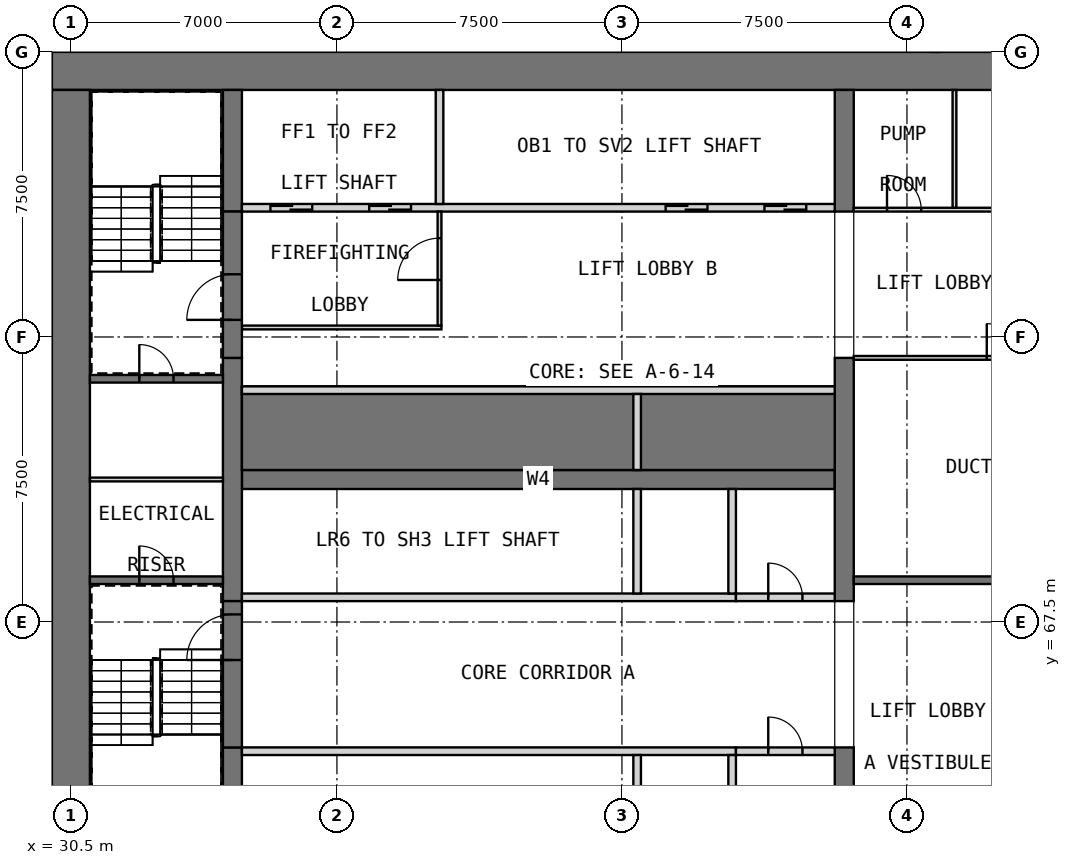
"""IFC4 building model, lengths in metres.
Left out: names, types, materials, properties, quantities, classifications, styles, units other than length and angle.
Written with IfcOpenShell. Run it as: python <this file> out.ifc"""

import sys

from ifc_helpers import new_model, si_unit, direction, frame, frame_2d, origin, place, context, subcontext, project, spatial, rectangle, extrude, element, fill, save


model = new_model("IFC4")
c1 = context("Model", 3, precision=1e-05, world=origin(), true_north=direction((0.0, 1.0)))
c2 = subcontext(c1, "Body", "Model", "MODEL_VIEW")
j1 = project(units=[si_unit("LENGTHUNIT", "METRE"), si_unit("PLANEANGLEUNIT", "RADIAN")], contexts=[c1])
p1 = place(None, origin())
s1 = spatial("IfcSite", under=j1, at=p1, CompositionType="ELEMENT")
p2 = place(p1, origin())
s2 = spatial("IfcBuilding", under=s1, at=p2, CompositionType="ELEMENT")
p3 = place(p2, frame((0.0, 0.0, 118.7)))
s3 = spatial("IfcBuildingStorey", under=s2, at=p3, CompositionType="ELEMENT", Elevation=118.7)
p4 = place(p3, frame((30.0, 82.0, 0.0), z_axis=(0.0, 0.0, 1.0), x_axis=(1.0, 0.0, 0.0)))
e1 = element("IfcWall", 1, at=p4, inside=s3, PredefinedType="SHEAR", context=c2, shape_type="SweptSolid", body=[
    extrude(rectangle(XDim=30.0, YDim=1.0, at=frame_2d((15.0, 0.0))), origin(), (0.0, 0.0, 1.0), 5.5),
])
p5 = place(p3, frame((30.5, 61.0, 0.0), z_axis=(0.0, 0.0, 1.0), x_axis=(0.0, 1.0, 0.0)))
e2 = element("IfcWall", 2, at=p5, inside=s3, PredefinedType="SHEAR", context=c2, shape_type="SweptSolid", body=[
    extrude(rectangle(XDim=20.5, YDim=1.0, at=frame_2d((10.25, 0.0))), origin(), (0.0, 0.0, 1.0), 5.5),
])
p6 = place(p3, frame((35.0, 71.25, 0.0), z_axis=(0.0, 0.0, 1.0), x_axis=(1.0, 0.0, 0.0)))
e3 = element("IfcWall", 3, at=p6, inside=s3, PredefinedType="SHEAR", context=c2, shape_type="SweptSolid", body=[
    extrude(rectangle(XDim=15.6, YDim=0.5, at=frame_2d((7.8, 0.0))), origin(), (0.0, 0.0, 1.0), 5.5),
])
p7 = place(p3, frame((34.75, 61.0, 0.0), z_axis=(0.0, 0.0, 1.0), x_axis=(0.0, 1.0, 0.0)))
e4 = element("IfcWall", 4, at=p7, inside=s3, PredefinedType="SHEAR", context=c2, shape_type="SweptSolid", body=[
    extrude(rectangle(XDim=3.2, YDim=0.5, at=frame_2d((1.6, 0.0))), origin(), (0.0, 0.0, 1.0), 5.5),
])
p8 = place(p3, frame((34.75, 68.05, 0.0), z_axis=(0.0, 0.0, 1.0), x_axis=(0.0, 1.0, 0.0)))
e5 = element("IfcWall", 5, at=p8, inside=s3, PredefinedType="SHEAR", context=c2, shape_type="SweptSolid", body=[
    extrude(rectangle(XDim=6.4, YDim=0.5, at=frame_2d((3.2, 0.0))), origin(), (0.0, 0.0, 1.0), 5.5),
])
for number, where, z_axis, x_axis in (
    (6, (34.75, 78.3, 0.0), (0.0, 0.0, 1.0), (0.0, 1.0, 0.0)),
    (7, (50.85, 61.0, 0.0), (0.0, 0.0, 1.0), (0.0, 1.0, 0.0)),
):
    element("IfcWall", number, at=place(p3, frame(where, z_axis=z_axis, x_axis=x_axis)), inside=s3, PredefinedType="SHEAR", context=c2, shape_type="SweptSolid", body=[
        extrude(rectangle(XDim=3.2, YDim=0.5, at=frame_2d((1.6, 0.0))), origin(), (0.0, 0.0, 1.0), 5.5),
    ])
p9 = place(p3, frame((50.85, 68.05, 0.0), z_axis=(0.0, 0.0, 1.0), x_axis=(0.0, 1.0, 0.0)))
e8 = element("IfcWall", 8, at=p9, inside=s3, PredefinedType="SHEAR", context=c2, shape_type="SweptSolid", body=[
    extrude(rectangle(XDim=6.4, YDim=0.5, at=frame_2d((3.2, 0.0))), origin(), (0.0, 0.0, 1.0), 5.5),
])
p10 = place(p3, frame((50.85, 78.3, 0.0), z_axis=(0.0, 0.0, 1.0), x_axis=(0.0, 1.0, 0.0)))
e9 = element("IfcWall", 9, at=p10, inside=s3, PredefinedType="SHEAR", context=c2, shape_type="SweptSolid", body=[
    extrude(rectangle(XDim=3.2, YDim=0.5, at=frame_2d((1.6, 0.0))), origin(), (0.0, 0.0, 1.0), 5.5),
])
p11 = place(p3, frame((35.0, 64.1, 0.0), z_axis=(0.0, 0.0, 1.0), x_axis=(1.0, 0.0, 0.0)))
e10 = element("IfcWall", 10, at=p11, inside=s3, PredefinedType="SOLIDWALL", context=c2, shape_type="SweptSolid", body=[
    extrude(rectangle(XDim=13.0, YDim=0.2, at=frame_2d((6.5, 0.0))), origin(), (0.0, 0.0, 1.0), 5.5),
])
for number, where, z_axis, x_axis in (
    (11, (45.4, 61.0, 0.0), (0.0, 0.0, 1.0), (0.0, 1.0, 0.0)),
    (12, (47.9, 61.0, 0.0), (0.0, 0.0, 1.0), (0.0, 1.0, 0.0)),
):
    element("IfcWall", number, at=place(p3, frame(where, z_axis=z_axis, x_axis=x_axis)), inside=s3, PredefinedType="SOLIDWALL", context=c2, shape_type="SweptSolid", body=[
        extrude(rectangle(XDim=3.0, YDim=0.2, at=frame_2d((1.5, 0.0))), origin(), (0.0, 0.0, 1.0), 5.5),
    ])
p12 = place(p3, frame((48.0, 64.1, 0.0), z_axis=(0.0, 0.0, 1.0), x_axis=(1.0, 0.0, 0.0)))
e13 = element("IfcWall", 13, at=p12, inside=s3, PredefinedType="PARTITIONING", context=c2, shape_type="SweptSolid", body=[
    extrude(rectangle(XDim=2.6, YDim=0.2, at=frame_2d((1.3, 0.0))), origin(), (0.0, 0.0, 1.0), 5.2),
])
p13 = place(p12, frame((0.85, 0.0, 0.0)))
e14 = element("IfcOpeningElement", 14, at=p13, cuts=e13, PredefinedType="OPENING", context=c2, shape_type="SweptSolid", body=[
    extrude(rectangle(XDim=0.9, YDim=2.1, at=frame_2d((0.45, 1.05))), frame((0.0, 0.11, 0.0), z_axis=(0.0, -1.0, 0.0), x_axis=(1.0, 0.0, 0.0)), (0.0, 0.0, 1.0), 0.22),
])
p14 = place(p3, frame((35.0, 68.15, 0.0), z_axis=(0.0, 0.0, 1.0), x_axis=(1.0, 0.0, 0.0)))
e15 = element("IfcWall", 15, at=p14, inside=s3, PredefinedType="SOLIDWALL", context=c2, shape_type="SweptSolid", body=[
    extrude(rectangle(XDim=13.0, YDim=0.2, at=frame_2d((6.5, 0.0))), origin(), (0.0, 0.0, 1.0), 5.5),
])
for number, where, z_axis, x_axis in (
    (16, (45.4, 68.25, 0.0), (0.0, 0.0, 1.0), (0.0, 1.0, 0.0)),
    (17, (47.9, 68.25, 0.0), (0.0, 0.0, 1.0), (0.0, 1.0, 0.0)),
):
    element("IfcWall", number, at=place(p3, frame(where, z_axis=z_axis, x_axis=x_axis)), inside=s3, PredefinedType="SOLIDWALL", context=c2, shape_type="SweptSolid", body=[
        extrude(rectangle(XDim=2.75, YDim=0.2, at=frame_2d((1.375, 0.0))), origin(), (0.0, 0.0, 1.0), 5.5),
    ])
p15 = place(p3, frame((48.0, 68.15, 0.0), z_axis=(0.0, 0.0, 1.0), x_axis=(1.0, 0.0, 0.0)))
e18 = element("IfcWall", 18, at=p15, inside=s3, PredefinedType="PARTITIONING", context=c2, shape_type="SweptSolid", body=[
    extrude(rectangle(XDim=2.6, YDim=0.2, at=frame_2d((1.3, 0.0))), origin(), (0.0, 0.0, 1.0), 5.2),
])
p16 = place(p15, frame((0.85, 0.0, 0.0)))
e19 = element("IfcOpeningElement", 19, at=p16, cuts=e18, PredefinedType="OPENING", context=c2, shape_type="SweptSolid", body=[
    extrude(rectangle(XDim=0.9, YDim=2.1, at=frame_2d((0.45, 1.05))), frame((0.0, 0.11, 0.0), z_axis=(0.0, -1.0, 0.0), x_axis=(1.0, 0.0, 0.0)), (0.0, 0.0, 1.0), 0.22),
])
p17 = place(p3, frame((35.0, 72.6, 0.0), z_axis=(0.0, 0.0, 1.0), x_axis=(1.0, 0.0, 0.0)))
e20 = element("IfcWall", 20, at=p17, inside=s3, PredefinedType="SOLIDWALL", context=c2, shape_type="SweptSolid", body=[
    extrude(rectangle(XDim=15.6, YDim=2.2, at=frame_2d((7.8, 0.0))), origin(), (0.0, 0.0, 1.0), 3.9),
])
p18 = place(p3, frame((35.0, 73.6, 3.9), z_axis=(0.0, 0.0, 1.0), x_axis=(1.0, 0.0, 0.0)))
e21 = element("IfcWall", 21, at=p18, inside=s3, PredefinedType="SOLIDWALL", context=c2, shape_type="SweptSolid", body=[
    extrude(rectangle(XDim=15.6, YDim=0.2, at=frame_2d((7.8, 0.0))), origin(), (0.0, 0.0, 1.0), 1.6),
])
p19 = place(p3, frame((45.4, 71.5, 3.9), z_axis=(0.0, 0.0, 1.0), x_axis=(0.0, 1.0, 0.0)))
e22 = element("IfcWall", 22, at=p19, inside=s3, PredefinedType="SOLIDWALL", context=c2, shape_type="SweptSolid", body=[
    extrude(rectangle(XDim=2.0, YDim=0.2, at=frame_2d((1.0, 0.0))), origin(), (0.0, 0.0, 1.0), 1.6),
])
p20 = place(p3, frame((35.0, 78.4, 0.0), z_axis=(0.0, 0.0, 1.0), x_axis=(1.0, 0.0, 0.0)))
e23 = element("IfcWall", 23, at=p20, inside=s3, PredefinedType="SOLIDWALL", context=c2, shape_type="SweptSolid", body=[
    extrude(rectangle(XDim=15.6, YDim=0.2, at=frame_2d((7.8, 0.0))), origin(), (0.0, 0.0, 1.0), 5.5),
])
p21 = place(p20, frame((0.75, 0.0, 0.0)))
e24 = element("IfcOpeningElement", 24, at=p21, cuts=e23, PredefinedType="OPENING", context=c2, shape_type="SweptSolid", body=[
    extrude(rectangle(XDim=1.1, YDim=2.1, at=frame_2d((0.55, 1.05))), frame((0.0, 0.11, 0.0), z_axis=(0.0, -1.0, 0.0), x_axis=(1.0, 0.0, 0.0)), (0.0, 0.0, 1.0), 0.22),
])
p22 = place(p20, frame((3.35, 0.0, 0.0)))
e25 = element("IfcOpeningElement", 25, at=p22, cuts=e23, PredefinedType="OPENING", context=c2, shape_type="SweptSolid", body=[
    extrude(rectangle(XDim=1.1, YDim=2.1, at=frame_2d((0.55, 1.05))), frame((0.0, 0.11, 0.0), z_axis=(0.0, -1.0, 0.0), x_axis=(1.0, 0.0, 0.0)), (0.0, 0.0, 1.0), 0.22),
])
p23 = place(p20, frame((11.15, 0.0, 0.0)))
e26 = element("IfcOpeningElement", 26, at=p23, cuts=e23, PredefinedType="OPENING", context=c2, shape_type="SweptSolid", body=[
    extrude(rectangle(XDim=1.1, YDim=2.1, at=frame_2d((0.55, 1.05))), frame((0.0, 0.11, 0.0), z_axis=(0.0, -1.0, 0.0), x_axis=(1.0, 0.0, 0.0)), (0.0, 0.0, 1.0), 0.22),
])
p24 = place(p20, frame((13.75, 0.0, 0.0)))
e27 = element("IfcOpeningElement", 27, at=p24, cuts=e23, PredefinedType="OPENING", context=c2, shape_type="SweptSolid", body=[
    extrude(rectangle(XDim=1.1, YDim=2.1, at=frame_2d((0.55, 1.05))), frame((0.0, 0.11, 0.0), z_axis=(0.0, -1.0, 0.0), x_axis=(1.0, 0.0, 0.0)), (0.0, 0.0, 1.0), 0.22),
])
p25 = place(p3, frame((40.2, 78.5, 0.0), z_axis=(0.0, 0.0, 1.0), x_axis=(0.0, 1.0, 0.0)))
e28 = element("IfcWall", 28, at=p25, inside=s3, PredefinedType="SOLIDWALL", context=c2, shape_type="SweptSolid", body=[
    extrude(rectangle(XDim=3.0, YDim=0.2, at=frame_2d((1.5, 0.0))), origin(), (0.0, 0.0, 1.0), 5.5),
])
p26 = place(p3, frame((35.0, 75.25, 0.0), z_axis=(0.0, 0.0, 1.0), x_axis=(1.0, 0.0, 0.0)))
e29 = element("IfcWall", 29, at=p26, inside=s3, PredefinedType="PARTITIONING", context=c2, shape_type="SweptSolid", body=[
    extrude(rectangle(XDim=5.25, YDim=0.1, at=frame_2d((2.625, 0.0))), origin(), (0.0, 0.0, 1.0), 5.2),
])
p27 = place(p3, frame((40.2, 75.3, 0.0), z_axis=(0.0, 0.0, 1.0), x_axis=(0.0, 1.0, 0.0)))
e30 = element("IfcWall", 30, at=p27, inside=s3, PredefinedType="PARTITIONING", context=c2, shape_type="SweptSolid", body=[
    extrude(rectangle(XDim=3.0, YDim=0.1, at=frame_2d((1.5, 0.0))), origin(), (0.0, 0.0, 1.0), 5.2),
])
p28 = place(p27, frame((1.2, 0.0, 0.0)))
e31 = element("IfcOpeningElement", 31, at=p28, cuts=e30, PredefinedType="OPENING", context=c2, shape_type="SweptSolid", body=[
    extrude(rectangle(XDim=1.1, YDim=2.1, at=frame_2d((0.55, 1.05))), frame((0.0, 0.06, 0.0), z_axis=(0.0, -1.0, 0.0), x_axis=(1.0, 0.0, 0.0)), (0.0, 0.0, 1.0), 0.12),
])
p29 = place(p3, frame((34.75, 64.2, 0.0), z_axis=(0.0, 0.0, 1.0), x_axis=(0.0, 1.0, 0.0)))
e32 = element("IfcWall", 32, at=p29, inside=s3, PredefinedType="SOLIDWALL", context=c2, shape_type="SweptSolid", body=[
    extrude(rectangle(XDim=3.85, YDim=0.5, at=frame_2d((1.925, 0.0))), origin(), (0.0, 0.0, 1.0), 4.3),
])
p30 = place(p29, frame((2.3, 0.0, 0.0)))
e33 = element("IfcOpeningElement", 33, at=p30, cuts=e32, PredefinedType="OPENING", context=c2, shape_type="SweptSolid", body=[
    extrude(rectangle(XDim=1.2, YDim=2.1, at=frame_2d((0.6, 1.05))), frame((0.0, 0.26, 0.0), z_axis=(0.0, -1.0, 0.0), x_axis=(1.0, 0.0, 0.0)), (0.0, 0.0, 1.0), 0.52),
])
p31 = place(p3, frame((34.75, 74.45, 0.0), z_axis=(0.0, 0.0, 1.0), x_axis=(0.0, 1.0, 0.0)))
e34 = element("IfcWall", 34, at=p31, inside=s3, PredefinedType="SOLIDWALL", context=c2, shape_type="SweptSolid", body=[
    extrude(rectangle(XDim=3.85, YDim=0.5, at=frame_2d((1.925, 0.0))), origin(), (0.0, 0.0, 1.0), 4.3),
])
p32 = place(p31, frame((1.0, 0.0, 0.0)))
e35 = element("IfcOpeningElement", 35, at=p32, cuts=e34, PredefinedType="OPENING", context=c2, shape_type="SweptSolid", body=[
    extrude(rectangle(XDim=1.2, YDim=2.1, at=frame_2d((0.6, 1.05))), frame((0.0, 0.26, 0.0), z_axis=(0.0, -1.0, 0.0), x_axis=(1.0, 0.0, 0.0)), (0.0, 0.0, 1.0), 0.52),
])
p33 = place(p3, frame((31.0, 68.6, 0.0), z_axis=(0.0, 0.0, 1.0), x_axis=(1.0, 0.0, 0.0)))
e36 = element("IfcWall", 36, at=p33, inside=s3, PredefinedType="SOLIDWALL", context=c2, shape_type="SweptSolid", body=[
    extrude(rectangle(XDim=3.5, YDim=0.2, at=frame_2d((1.75, 0.0))), origin(), (0.0, 0.0, 1.0), 5.2),
])
p34 = place(p33, frame((1.3, 0.0, 0.0)))
e37 = element("IfcOpeningElement", 37, at=p34, cuts=e36, PredefinedType="OPENING", context=c2, shape_type="SweptSolid", body=[
    extrude(rectangle(XDim=0.9, YDim=2.1, at=frame_2d((0.45, 1.05))), frame((0.0, 0.11, 0.0), z_axis=(0.0, -1.0, 0.0), x_axis=(1.0, 0.0, 0.0)), (0.0, 0.0, 1.0), 0.22),
])
p35 = place(p3, frame((31.0, 73.9, 0.0), z_axis=(0.0, 0.0, 1.0), x_axis=(1.0, 0.0, 0.0)))
e38 = element("IfcWall", 38, at=p35, inside=s3, PredefinedType="SOLIDWALL", context=c2, shape_type="SweptSolid", body=[
    extrude(rectangle(XDim=3.5, YDim=0.2, at=frame_2d((1.75, 0.0))), origin(), (0.0, 0.0, 1.0), 5.2),
])
p36 = place(p35, frame((1.3, 0.0, 0.0)))
e39 = element("IfcOpeningElement", 39, at=p36, cuts=e38, PredefinedType="OPENING", context=c2, shape_type="SweptSolid", body=[
    extrude(rectangle(XDim=0.9, YDim=2.1, at=frame_2d((0.45, 1.05))), frame((0.0, 0.11, 0.0), z_axis=(0.0, -1.0, 0.0), x_axis=(1.0, 0.0, 0.0)), (0.0, 0.0, 1.0), 0.22),
])
p37 = place(p3, frame((51.1, 68.6, 0.0), z_axis=(0.0, 0.0, 1.0), x_axis=(1.0, 0.0, 0.0)))
e40 = element("IfcWall", 40, at=p37, inside=s3, PredefinedType="SOLIDWALL", context=c2, shape_type="SweptSolid", body=[
    extrude(rectangle(XDim=7.9, YDim=0.2, at=frame_2d((3.95, 0.0))), origin(), (0.0, 0.0, 1.0), 5.2),
])
p38 = place(p3, frame((31.0, 71.25, 0.0), z_axis=(0.0, 0.0, 1.0), x_axis=(1.0, 0.0, 0.0)))
e41 = element("IfcWall", 41, at=p38, inside=s3, PredefinedType="PARTITIONING", context=c2, shape_type="SweptSolid", body=[
    extrude(rectangle(XDim=3.5, YDim=0.1, at=frame_2d((1.75, 0.0))), origin(), (0.0, 0.0, 1.0), 5.2),
])
p39 = place(p3, frame((51.1, 74.45, 0.0), z_axis=(0.0, 0.0, 1.0), x_axis=(1.0, 0.0, 0.0)))
e42 = element("IfcWall", 42, at=p39, inside=s3, PredefinedType="PARTITIONING", context=c2, shape_type="SweptSolid", body=[
    extrude(rectangle(XDim=7.9, YDim=0.1, at=frame_2d((3.95, 0.0))), origin(), (0.0, 0.0, 1.0), 5.2),
])
p40 = place(p39, frame((3.5, 0.0, 0.0)))
e43 = element("IfcOpeningElement", 43, at=p40, cuts=e42, PredefinedType="OPENING", context=c2, shape_type="SweptSolid", body=[
    extrude(rectangle(XDim=0.9, YDim=2.1, at=frame_2d((0.45, 1.05))), frame((0.0, 0.06, 0.0), z_axis=(0.0, -1.0, 0.0), x_axis=(1.0, 0.0, 0.0)), (0.0, 0.0, 1.0), 0.12),
])
p41 = place(p3, frame((51.1, 78.35, 0.0), z_axis=(0.0, 0.0, 1.0), x_axis=(1.0, 0.0, 0.0)))
e44 = element("IfcWall", 44, at=p41, inside=s3, PredefinedType="PARTITIONING", context=c2, shape_type="SweptSolid", body=[
    extrude(rectangle(XDim=7.9, YDim=0.1, at=frame_2d((3.95, 0.0))), origin(), (0.0, 0.0, 1.0), 5.2),
])
p42 = place(p41, frame((0.875, 0.0, 0.0)))
e45 = element("IfcOpeningElement", 45, at=p42, cuts=e44, PredefinedType="OPENING", context=c2, shape_type="SweptSolid", body=[
    extrude(rectangle(XDim=0.9, YDim=2.1, at=frame_2d((0.45, 1.05))), frame((0.0, 0.06, 0.0), z_axis=(0.0, -1.0, 0.0), x_axis=(1.0, 0.0, 0.0)), (0.0, 0.0, 1.0), 0.12),
])
p43 = place(p41, frame((4.825, 0.0, 0.0)))
e46 = element("IfcOpeningElement", 46, at=p43, cuts=e44, PredefinedType="OPENING", context=c2, shape_type="SweptSolid", body=[
    extrude(rectangle(XDim=0.9, YDim=2.1, at=frame_2d((0.45, 1.05))), frame((0.0, 0.06, 0.0), z_axis=(0.0, -1.0, 0.0), x_axis=(1.0, 0.0, 0.0)), (0.0, 0.0, 1.0), 0.12),
])
p44 = place(p3, frame((53.75, 78.4, 0.0), z_axis=(0.0, 0.0, 1.0), x_axis=(0.0, 1.0, 0.0)))
e47 = element("IfcWall", 47, at=p44, inside=s3, PredefinedType="PARTITIONING", context=c2, shape_type="SweptSolid", body=[
    extrude(rectangle(XDim=3.1, YDim=0.1, at=frame_2d((1.55, 0.0))), origin(), (0.0, 0.0, 1.0), 5.2),
])
p45 = place(p13, origin())
e48 = element("IfcDoor", 48, at=p45, inside=s3, OperationType="SINGLE_SWING_LEFT", PredefinedType="DOOR", context=c2, shape_type="SweptSolid", body=[
    extrude(rectangle(XDim=0.9, YDim=2.1, at=frame_2d((0.45, 1.05))), frame((0.0, 0.025, 0.0), z_axis=(0.0, -1.0, 0.0), x_axis=(1.0, 0.0, 0.0)), (0.0, 0.0, 1.0), 0.05),
])
fill(e14, e48)
p46 = place(p16, origin())
e49 = element("IfcDoor", 49, at=p46, inside=s3, OperationType="SINGLE_SWING_LEFT", PredefinedType="DOOR", context=c2, shape_type="SweptSolid", body=[
    extrude(rectangle(XDim=0.9, YDim=2.1, at=frame_2d((0.45, 1.05))), frame((0.0, 0.025, 0.0), z_axis=(0.0, -1.0, 0.0), x_axis=(1.0, 0.0, 0.0)), (0.0, 0.0, 1.0), 0.05),
])
fill(e19, e49)
p47 = place(p21, origin())
e50 = element("IfcDoor", 50, at=p47, inside=s3, OperationType="DOUBLE_DOOR_SLIDING", PredefinedType="DOOR", context=c2, shape_type="SweptSolid", body=[
    extrude(rectangle(XDim=1.1, YDim=2.1, at=frame_2d((0.55, 1.05))), frame((0.0, 0.025, 0.0), z_axis=(0.0, -1.0, 0.0), x_axis=(1.0, 0.0, 0.0)), (0.0, 0.0, 1.0), 0.05),
])
fill(e24, e50)
p48 = place(p22, origin())
e51 = element("IfcDoor", 51, at=p48, inside=s3, OperationType="DOUBLE_DOOR_SLIDING", PredefinedType="DOOR", context=c2, shape_type="SweptSolid", body=[
    extrude(rectangle(XDim=1.1, YDim=2.1, at=frame_2d((0.55, 1.05))), frame((0.0, 0.025, 0.0), z_axis=(0.0, -1.0, 0.0), x_axis=(1.0, 0.0, 0.0)), (0.0, 0.0, 1.0), 0.05),
])
fill(e25, e51)
p49 = place(p23, origin())
e52 = element("IfcDoor", 52, at=p49, inside=s3, OperationType="DOUBLE_DOOR_SLIDING", PredefinedType="DOOR", context=c2, shape_type="SweptSolid", body=[
    extrude(rectangle(XDim=1.1, YDim=2.1, at=frame_2d((0.55, 1.05))), frame((0.0, 0.025, 0.0), z_axis=(0.0, -1.0, 0.0), x_axis=(1.0, 0.0, 0.0)), (0.0, 0.0, 1.0), 0.05),
])
fill(e26, e52)
p50 = place(p24, origin())
e53 = element("IfcDoor", 53, at=p50, inside=s3, OperationType="DOUBLE_DOOR_SLIDING", PredefinedType="DOOR", context=c2, shape_type="SweptSolid", body=[
    extrude(rectangle(XDim=1.1, YDim=2.1, at=frame_2d((0.55, 1.05))), frame((0.0, 0.025, 0.0), z_axis=(0.0, -1.0, 0.0), x_axis=(1.0, 0.0, 0.0)), (0.0, 0.0, 1.0), 0.05),
])
fill(e27, e53)
p51 = place(p28, origin())
e54 = element("IfcDoor", 54, at=p51, inside=s3, OperationType="SINGLE_SWING_LEFT", PredefinedType="DOOR", context=c2, shape_type="SweptSolid", body=[
    extrude(rectangle(XDim=1.1, YDim=2.1, at=frame_2d((0.55, 1.05))), frame((0.0, 0.025, 0.0), z_axis=(0.0, -1.0, 0.0), x_axis=(1.0, 0.0, 0.0)), (0.0, 0.0, 1.0), 0.05),
])
fill(e31, e54)
p52 = place(p30, origin())
e55 = element("IfcDoor", 55, at=p52, inside=s3, OperationType="SINGLE_SWING_LEFT", PredefinedType="DOOR", context=c2, shape_type="SweptSolid", body=[
    extrude(rectangle(XDim=1.2, YDim=2.1, at=frame_2d((0.6, 1.05))), frame((0.0, 0.025, 0.0), z_axis=(0.0, -1.0, 0.0), x_axis=(1.0, 0.0, 0.0)), (0.0, 0.0, 1.0), 0.05),
])
fill(e33, e55)
p53 = place(p32, origin())
e56 = element("IfcDoor", 56, at=p53, inside=s3, OperationType="SINGLE_SWING_RIGHT", PredefinedType="DOOR", context=c2, shape_type="SweptSolid", body=[
    extrude(rectangle(XDim=1.2, YDim=2.1, at=frame_2d((0.6, 1.05))), frame((0.0, 0.025, 0.0), z_axis=(0.0, -1.0, 0.0), x_axis=(1.0, 0.0, 0.0)), (0.0, 0.0, 1.0), 0.05),
])
fill(e35, e56)
p54 = place(p34, origin())
e57 = element("IfcDoor", 57, at=p54, inside=s3, OperationType="SINGLE_SWING_LEFT", PredefinedType="DOOR", context=c2, shape_type="SweptSolid", body=[
    extrude(rectangle(XDim=0.9, YDim=2.1, at=frame_2d((0.45, 1.05))), frame((0.0, 0.025, 0.0), z_axis=(0.0, -1.0, 0.0), x_axis=(1.0, 0.0, 0.0)), (0.0, 0.0, 1.0), 0.05),
])
fill(e37, e57)
p55 = place(p36, origin())
e58 = element("IfcDoor", 58, at=p55, inside=s3, OperationType="SINGLE_SWING_RIGHT", PredefinedType="DOOR", context=c2, shape_type="SweptSolid", body=[
    extrude(rectangle(XDim=0.9, YDim=2.1, at=frame_2d((0.45, 1.05))), frame((0.0, 0.025, 0.0), z_axis=(0.0, -1.0, 0.0), x_axis=(1.0, 0.0, 0.0)), (0.0, 0.0, 1.0), 0.05),
])
fill(e39, e58)
p56 = place(p40, origin())
e59 = element("IfcDoor", 59, at=p56, inside=s3, OperationType="SINGLE_SWING_LEFT", PredefinedType="DOOR", context=c2, shape_type="SweptSolid", body=[
    extrude(rectangle(XDim=0.9, YDim=2.1, at=frame_2d((0.45, 1.05))), frame((0.0, 0.025, 0.0), z_axis=(0.0, -1.0, 0.0), x_axis=(1.0, 0.0, 0.0)), (0.0, 0.0, 1.0), 0.05),
])
fill(e43, e59)
p57 = place(p42, origin())
e60 = element("IfcDoor", 60, at=p57, inside=s3, OperationType="SINGLE_SWING_LEFT", PredefinedType="DOOR", context=c2, shape_type="SweptSolid", body=[
    extrude(rectangle(XDim=0.9, YDim=2.1, at=frame_2d((0.45, 1.05))), frame((0.0, 0.025, 0.0), z_axis=(0.0, -1.0, 0.0), x_axis=(1.0, 0.0, 0.0)), (0.0, 0.0, 1.0), 0.05),
])
fill(e45, e60)
save(model, sys.argv[1])
